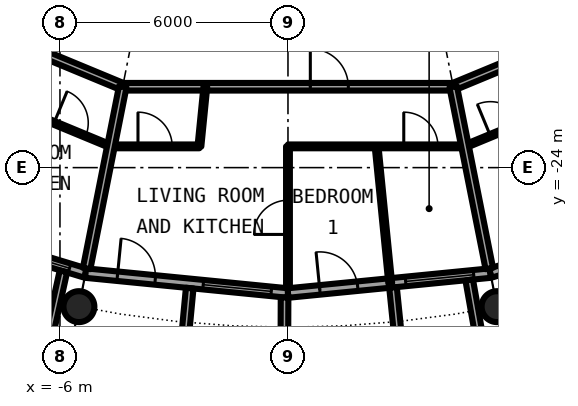
"""IFC4 building model, lengths in metres.
Left out: names, types, materials, properties, quantities, classifications, styles, units other than length and angle.
Written with IfcOpenShell. Run it as: python <this file> out.ifc"""

import sys

from ifc_helpers import new_model, si_unit, direction, frame, frame_2d, origin, origin_2d, place, context, subcontext, project, spatial, rectangle, hollow_circle, extrude, element, fill, save


model = new_model("IFC4")
c1 = context("Model", 3, precision=1e-05, world=origin(), true_north=direction((0.0, 1.0)))
c2 = subcontext(c1, "Body", "Model", "MODEL_VIEW")
j1 = project(units=[si_unit("LENGTHUNIT", "METRE"), si_unit("PLANEANGLEUNIT", "RADIAN")], contexts=[c1])
p1 = place(None, origin())
s1 = spatial("IfcSite", under=j1, at=p1, CompositionType="ELEMENT")
p2 = place(p1, origin())
s2 = spatial("IfcBuilding", under=s1, at=p2, CompositionType="ELEMENT")
p3 = place(p2, frame((0.0, 0.0, 170.75)))
s3 = spatial("IfcBuildingStorey", under=s2, at=p3, CompositionType="ELEMENT", Elevation=170.75)
for number, where, z_axis, x_axis in (
    (1, (-5.501, -27.658, 0.0), (0.0, 0.0, 1.0), (1.0, 0.0, 0.0)),
    (2, (5.501, -27.658, 0.0), (0.0, 0.0, 1.0), (1.0, 0.0, 0.0)),
):
    element("IfcColumn", number, at=place(p3, frame(where, z_axis=z_axis, x_axis=x_axis)), inside=s3, PredefinedType="COLUMN", context=c2, shape_type="SweptSolid", body=[
        extrude(hollow_circle(Radius=0.406, WallThickness=0.04, at=origin_2d()), origin(), (0.0, 0.0, 1.0), 3.05),
    ])
p4 = place(p3, frame((-10.447, -25.222, 0.0), z_axis=(0.0, 0.0, 1.0), x_axis=(0.956965678721, -0.290201119486, 0.0)))
e3 = element("IfcWall", 3, at=p4, inside=s3, PredefinedType="SOLIDWALL", context=c2, shape_type="SweptSolid", body=[
    extrude(rectangle(XDim=5.351, YDim=0.25, at=frame_2d((2.676, 0.0))), origin(), (0.0, 0.0, 1.0), 2.7),
])
p5 = place(p4, frame((0.841, 0.0, 0.0)))
e4 = element("IfcOpeningElement", 4, at=p5, cuts=e3, PredefinedType="OPENING", context=c2, shape_type="SweptSolid", body=[
    extrude(rectangle(XDim=1.0, YDim=2.2, at=frame_2d((0.5, 1.1))), frame((0.0, 0.135, 0.0), z_axis=(0.0, -1.0, 0.0), x_axis=(1.0, 0.0, 0.0)), (0.0, 0.0, 1.0), 0.27),
])
p6 = place(p4, frame((3.111, 0.0, 0.3)))
e5 = element("IfcOpeningElement", 5, at=p6, cuts=e3, PredefinedType="OPENING", context=c2, shape_type="SweptSolid", body=[
    extrude(rectangle(XDim=1.8, YDim=2.1, at=frame_2d((0.9, 1.05))), frame((0.0, 0.135, 0.0), z_axis=(0.0, -1.0, 0.0), x_axis=(1.0, 0.0, 0.0)), (0.0, 0.0, 1.0), 0.27),
])
p7 = place(p3, frame((-5.909, -26.729, -0.03), z_axis=(0.0, 0.0, 1.0), x_axis=(-0.216409053917, -0.976302781612, 0.0)))
e6 = element("IfcWall", 6, at=p7, inside=s3, PredefinedType="SOLIDWALL", context=c2, shape_type="SweptSolid", body=[
    extrude(rectangle(XDim=2.925, YDim=0.2, at=frame_2d((1.463, 0.0))), origin(), (0.0, 0.0, 1.0), 2.73),
])
p8 = place(p3, frame((-5.326, -26.775, 0.0), z_axis=(0.0, 0.0, 1.0), x_axis=(0.995173996315, -0.098126026407, 0.0)))
e7 = element("IfcWall", 7, at=p8, inside=s3, PredefinedType="SOLIDWALL", context=c2, shape_type="SweptSolid", body=[
    extrude(rectangle(XDim=5.352, YDim=0.25, at=frame_2d((2.676, 0.0))), origin(), (0.0, 0.0, 1.0), 2.7),
])
p9 = place(p8, frame((0.841, 0.0, 0.0)))
e8 = element("IfcOpeningElement", 8, at=p9, cuts=e7, PredefinedType="OPENING", context=c2, shape_type="SweptSolid", body=[
    extrude(rectangle(XDim=1.0, YDim=2.2, at=frame_2d((0.5, 1.1))), frame((0.0, 0.135, 0.0), z_axis=(0.0, -1.0, 0.0), x_axis=(1.0, 0.0, 0.0)), (0.0, 0.0, 1.0), 0.27),
])
p10 = place(p8, frame((3.111, 0.0, 0.3)))
e9 = element("IfcOpeningElement", 9, at=p10, cuts=e7, PredefinedType="OPENING", context=c2, shape_type="SweptSolid", body=[
    extrude(rectangle(XDim=1.8, YDim=2.1, at=frame_2d((0.9, 1.05))), frame((0.0, 0.135, 0.0), z_axis=(0.0, -1.0, 0.0), x_axis=(1.0, 0.0, 0.0)), (0.0, 0.0, 1.0), 0.27),
])
p11 = place(p3, frame((-2.586, -27.171, -0.03), z_axis=(0.0, 0.0, 1.0), x_axis=(-0.094548432284, -0.995520262954, 0.0)))
e10 = element("IfcWall", 10, at=p11, inside=s3, PredefinedType="SOLIDWALL", context=c2, shape_type="SweptSolid", body=[
    extrude(rectangle(XDim=3.006, YDim=0.2, at=frame_2d((1.503, 0.0))), origin(), (0.0, 0.0, 1.0), 2.73),
])
p12 = place(p3, frame((-0.09, -27.417, -0.03), z_axis=(0.0, 0.0, 1.0), x_axis=(-0.00347308367, -0.999993968827, 0.0)))
e11 = element("IfcWall", 11, at=p12, inside=s3, PredefinedType="SOLIDWALL", context=c2, shape_type="SweptSolid", body=[
    extrude(rectangle(XDim=2.882, YDim=0.2, at=frame_2d((1.441, 0.0))), origin(), (0.0, 0.0, 1.0), 2.73),
])
p13 = place(p3, frame((0.0, -27.3, 0.0), z_axis=(0.0, 0.0, 1.0), x_axis=(0.995173996315, 0.098126026407, 0.0)))
e12 = element("IfcWall", 12, at=p13, inside=s3, PredefinedType="SOLIDWALL", context=c2, shape_type="SweptSolid", body=[
    extrude(rectangle(XDim=5.352, YDim=0.25, at=frame_2d((2.676, 0.0))), origin(), (0.0, 0.0, 1.0), 2.7),
])
p14 = place(p13, frame((0.841, 0.0, 0.0)))
e13 = element("IfcOpeningElement", 13, at=p14, cuts=e12, PredefinedType="OPENING", context=c2, shape_type="SweptSolid", body=[
    extrude(rectangle(XDim=1.0, YDim=2.2, at=frame_2d((0.5, 1.1))), frame((0.0, 0.135, 0.0), z_axis=(0.0, -1.0, 0.0), x_axis=(1.0, 0.0, 0.0)), (0.0, 0.0, 1.0), 0.27),
])
p15 = place(p13, frame((3.111, 0.0, 0.3)))
e14 = element("IfcOpeningElement", 14, at=p15, cuts=e12, PredefinedType="OPENING", context=c2, shape_type="SweptSolid", body=[
    extrude(rectangle(XDim=1.8, YDim=2.1, at=frame_2d((0.9, 1.05))), frame((0.0, 0.135, 0.0), z_axis=(0.0, -1.0, 0.0), x_axis=(1.0, 0.0, 0.0)), (0.0, 0.0, 1.0), 0.27),
])
p16 = place(p3, frame((2.764, -27.153, -0.03), z_axis=(0.0, 0.0, 1.0), x_axis=(0.101505487237, -0.994834979311, 0.0)))
e15 = element("IfcWall", 15, at=p16, inside=s3, PredefinedType="SOLIDWALL", context=c2, shape_type="SweptSolid", body=[
    extrude(rectangle(XDim=3.007, YDim=0.2, at=frame_2d((1.503, 0.0))), origin(), (0.0, 0.0, 1.0), 2.73),
])
p17 = place(p3, frame((4.769, -26.956, -0.03), z_axis=(0.0, 0.0, 1.0), x_axis=(0.174056778901, -0.984735618183, 0.0)))
e16 = element("IfcWall", 16, at=p17, inside=s3, PredefinedType="SOLIDWALL", context=c2, shape_type="SweptSolid", body=[
    extrude(rectangle(XDim=2.925, YDim=0.2, at=frame_2d((1.462, 0.0))), origin(), (0.0, 0.0, 1.0), 2.73),
])
p18 = place(p3, frame((5.326, -26.775, 0.0), z_axis=(0.0, 0.0, 1.0), x_axis=(0.956965678721, 0.290201119486, 0.0)))
e17 = element("IfcWall", 17, at=p18, inside=s3, PredefinedType="SOLIDWALL", context=c2, shape_type="SweptSolid", body=[
    extrude(rectangle(XDim=5.351, YDim=0.25, at=frame_2d((2.676, 0.0))), origin(), (0.0, 0.0, 1.0), 2.7),
])
p19 = place(p18, frame((0.841, 0.0, 0.0)))
e18 = element("IfcOpeningElement", 18, at=p19, cuts=e17, PredefinedType="OPENING", context=c2, shape_type="SweptSolid", body=[
    extrude(rectangle(XDim=1.0, YDim=2.2, at=frame_2d((0.5, 1.1))), frame((0.0, 0.135, 0.0), z_axis=(0.0, -1.0, 0.0), x_axis=(1.0, 0.0, 0.0)), (0.0, 0.0, 1.0), 0.27),
])
p20 = place(p18, frame((3.111, 0.0, 0.3)))
e19 = element("IfcOpeningElement", 19, at=p20, cuts=e17, PredefinedType="OPENING", context=c2, shape_type="SweptSolid", body=[
    extrude(rectangle(XDim=1.8, YDim=2.1, at=frame_2d((0.9, 1.05))), frame((0.0, 0.135, 0.0), z_axis=(0.0, -1.0, 0.0), x_axis=(1.0, 0.0, 0.0)), (0.0, 0.0, 1.0), 0.27),
])
p21 = place(p3, frame((-6.817, -22.549, 0.0), z_axis=(0.0, 0.0, 1.0), x_axis=(0.923923664861, -0.382576870068, 0.0)))
e20 = element("IfcWall", 20, at=p21, inside=s3, PredefinedType="PARTITIONING", context=c2, shape_type="SweptSolid", body=[
    extrude(rectangle(XDim=2.331, YDim=0.1, at=frame_2d((1.166, 0.0))), origin(), (0.0, 0.0, 1.0), 2.7),
])
p22 = place(p21, frame((0.716, 0.0, 0.0)))
e21 = element("IfcOpeningElement", 21, at=p22, cuts=e20, PredefinedType="OPENING", context=c2, shape_type="SweptSolid", body=[
    extrude(rectangle(XDim=0.9, YDim=2.3, at=frame_2d((0.45, 1.15))), frame((0.0, 0.06, 0.0), z_axis=(0.0, -1.0, 0.0), x_axis=(1.0, 0.0, 0.0)), (0.0, 0.0, 1.0), 0.12),
])
p23 = place(p3, frame((-4.663, -23.441, 0.0), z_axis=(0.0, 0.0, 1.0), x_axis=(1.0, 0.0, 0.0)))
e22 = element("IfcWall", 22, at=p23, inside=s3, PredefinedType="PARTITIONING", context=c2, shape_type="SweptSolid", body=[
    extrude(rectangle(XDim=2.332, YDim=0.1, at=frame_2d((1.166, 0.0))), origin(), (0.0, 0.0, 1.0), 2.7),
])
p24 = place(p23, frame((0.716, 0.0, 0.0)))
e23 = element("IfcOpeningElement", 23, at=p24, cuts=e22, PredefinedType="OPENING", context=c2, shape_type="SweptSolid", body=[
    extrude(rectangle(XDim=0.9, YDim=2.3, at=frame_2d((0.45, 1.15))), frame((0.0, 0.06, 0.0), z_axis=(0.0, -1.0, 0.0), x_axis=(1.0, 0.0, 0.0)), (0.0, 0.0, 1.0), 0.12),
])
p25 = place(p3, frame((0.0, -23.441, 0.0), z_axis=(0.0, 0.0, 1.0), x_axis=(1.0, 0.0, 0.0)))
e24 = element("IfcWall", 24, at=p25, inside=s3, PredefinedType="PARTITIONING", context=c2, shape_type="SweptSolid", body=[
    extrude(rectangle(XDim=4.663, YDim=0.1, at=frame_2d((2.332, 0.0))), origin(), (0.0, 0.0, 1.0), 2.7),
])
p26 = place(p25, frame((3.047, 0.0, 0.0)))
e25 = element("IfcOpeningElement", 25, at=p26, cuts=e24, PredefinedType="OPENING", context=c2, shape_type="SweptSolid", body=[
    extrude(rectangle(XDim=0.9, YDim=2.3, at=frame_2d((0.45, 1.15))), frame((0.0, 0.06, 0.0), z_axis=(0.0, -1.0, 0.0), x_axis=(1.0, 0.0, 0.0)), (0.0, 0.0, 1.0), 0.12),
])
p27 = place(p3, frame((4.656, -23.442, 0.0), z_axis=(0.0, 0.0, 1.0), x_axis=(0.923994503548, 0.382405749712, 0.0)))
e26 = element("IfcWall", 26, at=p27, inside=s3, PredefinedType="PARTITIONING", context=c2, shape_type="SweptSolid", body=[
    extrude(rectangle(XDim=4.663, YDim=0.1, at=frame_2d((2.331, 0.0))), origin(), (0.0, 0.0, 1.0), 2.7),
])
p28 = place(p27, frame((0.726, 0.0, 0.0)))
e27 = element("IfcOpeningElement", 27, at=p28, cuts=e26, PredefinedType="OPENING", context=c2, shape_type="SweptSolid", body=[
    extrude(rectangle(XDim=0.9, YDim=2.3, at=frame_2d((0.45, 1.15))), frame((0.0, 0.06, 0.0), z_axis=(0.0, -1.0, 0.0), x_axis=(1.0, 0.0, 0.0)), (0.0, 0.0, 1.0), 0.12),
])
p29 = place(p3, frame((-12.389, -18.542, 0.0), z_axis=(0.0, 0.0, 1.0), x_axis=(0.923867858178, -0.382711615483, 0.0)))
e28 = element("IfcWall", 28, at=p29, inside=s3, PredefinedType="PARTITIONING", context=c2, shape_type="SweptSolid", body=[
    extrude(rectangle(XDim=8.709, YDim=0.2, at=frame_2d((4.354, 0.0))), origin(), (0.0, 0.0, 1.0), 2.7),
])
p30 = place(p29, frame((2.763, 0.0, 0.0)))
e29 = element("IfcOpeningElement", 29, at=p30, cuts=e28, PredefinedType="OPENING", context=c2, shape_type="SweptSolid", body=[
    extrude(rectangle(XDim=1.0, YDim=2.3, at=frame_2d((0.5, 1.15))), frame((0.0, 0.11, 0.0), z_axis=(0.0, -1.0, 0.0), x_axis=(1.0, 0.0, 0.0)), (0.0, 0.0, 1.0), 0.22),
])
p31 = place(p3, frame((-4.351, -21.872, 0.0), z_axis=(0.0, 0.0, 1.0), x_axis=(1.0, 0.0, 0.0)))
e30 = element("IfcWall", 30, at=p31, inside=s3, PredefinedType="PARTITIONING", context=c2, shape_type="SweptSolid", body=[
    extrude(rectangle(XDim=8.702, YDim=0.2, at=frame_2d((4.351, 0.0))), origin(), (0.0, 0.0, 1.0), 2.7),
])
p32 = place(p31, frame((4.939, 0.0, 0.0)))
e31 = element("IfcOpeningElement", 31, at=p32, cuts=e30, PredefinedType="OPENING", context=c2, shape_type="SweptSolid", body=[
    extrude(rectangle(XDim=1.0, YDim=2.3, at=frame_2d((0.5, 1.15))), frame((0.0, 0.11, 0.0), z_axis=(0.0, -1.0, 0.0), x_axis=(1.0, 0.0, 0.0)), (0.0, 0.0, 1.0), 0.22),
])
p33 = place(p3, frame((4.351, -21.872, 0.0), z_axis=(0.0, 0.0, 1.0), x_axis=(0.923825356298, 0.382814199136, 0.0)))
e32 = element("IfcWall", 32, at=p33, inside=s3, PredefinedType="PARTITIONING", context=c2, shape_type="SweptSolid", body=[
    extrude(rectangle(XDim=8.704, YDim=0.2, at=frame_2d((4.352, 0.0))), origin(), (0.0, 0.0, 1.0), 2.7),
])
p34 = place(p33, frame((2.763, 0.0, 0.0)))
e33 = element("IfcOpeningElement", 33, at=p34, cuts=e32, PredefinedType="OPENING", context=c2, shape_type="SweptSolid", body=[
    extrude(rectangle(XDim=1.0, YDim=2.3, at=frame_2d((0.5, 1.15))), frame((0.0, 0.11, 0.0), z_axis=(0.0, -1.0, 0.0), x_axis=(1.0, 0.0, 0.0)), (0.0, 0.0, 1.0), 0.22),
])
p35 = place(p3, frame((-5.298, -26.654, 0.0), z_axis=(0.0, 0.0, 1.0), x_axis=(0.194931286287, 0.980816901173, 0.0)))
e34 = element("IfcWall", 34, at=p35, inside=s3, PredefinedType="PARTITIONING", context=c2, shape_type="SweptSolid", body=[
    extrude(rectangle(XDim=4.875, YDim=0.2, at=frame_2d((2.437, 0.0))), origin(), (0.0, 0.0, 1.0), 2.7),
])
p36 = place(p3, frame((-2.33, -23.441, 0.0), z_axis=(0.0, 0.0, 1.0), x_axis=(0.098951748623, 0.995092232632, 0.0)))
e35 = element("IfcWall", 35, at=p36, inside=s3, PredefinedType="PARTITIONING", context=c2, shape_type="SweptSolid", body=[
    extrude(rectangle(XDim=1.577, YDim=0.1, at=frame_2d((0.788, 0.0))), origin(), (0.0, 0.0, 1.0), 2.7),
])
p37 = place(p3, frame((0.0, -27.175, 0.0), z_axis=(0.0, 0.0, 1.0), x_axis=(0.0, 1.0, 0.0)))
e36 = element("IfcWall", 36, at=p37, inside=s3, PredefinedType="PARTITIONING", context=c2, shape_type="SweptSolid", body=[
    extrude(rectangle(XDim=3.734, YDim=0.1, at=frame_2d((1.867, 0.0))), origin(), (0.0, 0.0, 1.0), 2.7),
])
p38 = place(p37, frame((1.417, 0.0, 0.0)))
e37 = element("IfcOpeningElement", 37, at=p38, cuts=e36, PredefinedType="OPENING", context=c2, shape_type="SweptSolid", body=[
    extrude(rectangle(XDim=0.9, YDim=2.3, at=frame_2d((0.45, 1.15))), frame((0.0, 0.06, 0.0), z_axis=(0.0, -1.0, 0.0), x_axis=(1.0, 0.0, 0.0)), (0.0, 0.0, 1.0), 0.12),
])
p39 = place(p3, frame((2.332, -23.441, 0.0), z_axis=(0.0, 0.0, 1.0), x_axis=(0.099169741095, -0.995070531395, 0.0)))
e38 = element("IfcWall", 38, at=p39, inside=s3, PredefinedType="PARTITIONING", context=c2, shape_type="SweptSolid", body=[
    extrude(rectangle(XDim=3.619, YDim=0.1, at=frame_2d((1.81, 0.0))), origin(), (0.0, 0.0, 1.0), 2.7),
])
p40 = place(p3, frame((4.348, -21.873, 0.0), z_axis=(0.0, 0.0, 1.0), x_axis=(0.194931286287, -0.980816901173, 0.0)))
e39 = element("IfcWall", 39, at=p40, inside=s3, PredefinedType="PARTITIONING", context=c2, shape_type="SweptSolid", body=[
    extrude(rectangle(XDim=4.875, YDim=0.2, at=frame_2d((2.437, 0.0))), origin(), (0.0, 0.0, 1.0), 2.7),
])
p41 = place(p6, origin())
e40 = element("IfcWindow", 40, at=p41, inside=s3, PartitioningType="SINGLE_PANEL", PredefinedType="WINDOW", context=c2, shape_type="SweptSolid", body=[
    extrude(rectangle(XDim=1.8, YDim=2.1, at=frame_2d((0.9, 1.05))), frame((0.0, 0.03, 0.0), z_axis=(0.0, -1.0, 0.0), x_axis=(1.0, 0.0, 0.0)), (0.0, 0.0, 1.0), 0.06),
])
fill(e5, e40)
p42 = place(p9, origin())
e41 = element("IfcDoor", 41, at=p42, inside=s3, OperationType="SINGLE_SWING_LEFT", PredefinedType="DOOR", context=c2, shape_type="SweptSolid", body=[
    extrude(rectangle(XDim=1.0, YDim=2.2, at=frame_2d((0.5, 1.1))), frame((0.0, 0.025, 0.0), z_axis=(0.0, -1.0, 0.0), x_axis=(1.0, 0.0, 0.0)), (0.0, 0.0, 1.0), 0.05),
])
fill(e8, e41)
p43 = place(p10, origin())
e42 = element("IfcWindow", 42, at=p43, inside=s3, PartitioningType="SINGLE_PANEL", PredefinedType="WINDOW", context=c2, shape_type="SweptSolid", body=[
    extrude(rectangle(XDim=1.8, YDim=2.1, at=frame_2d((0.9, 1.05))), frame((0.0, 0.03, 0.0), z_axis=(0.0, -1.0, 0.0), x_axis=(1.0, 0.0, 0.0)), (0.0, 0.0, 1.0), 0.06),
])
fill(e9, e42)
p44 = place(p14, origin())
e43 = element("IfcDoor", 43, at=p44, inside=s3, OperationType="SINGLE_SWING_LEFT", PredefinedType="DOOR", context=c2, shape_type="SweptSolid", body=[
    extrude(rectangle(XDim=1.0, YDim=2.2, at=frame_2d((0.5, 1.1))), frame((0.0, 0.025, 0.0), z_axis=(0.0, -1.0, 0.0), x_axis=(1.0, 0.0, 0.0)), (0.0, 0.0, 1.0), 0.05),
])
fill(e13, e43)
p45 = place(p15, origin())
e44 = element("IfcWindow", 44, at=p45, inside=s3, PartitioningType="SINGLE_PANEL", PredefinedType="WINDOW", context=c2, shape_type="SweptSolid", body=[
    extrude(rectangle(XDim=1.8, YDim=2.1, at=frame_2d((0.9, 1.05))), frame((0.0, 0.03, 0.0), z_axis=(0.0, -1.0, 0.0), x_axis=(1.0, 0.0, 0.0)), (0.0, 0.0, 1.0), 0.06),
])
fill(e14, e44)
p46 = place(p22, origin())
e45 = element("IfcDoor", 45, at=p46, inside=s3, OperationType="SINGLE_SWING_LEFT", PredefinedType="DOOR", context=c2, shape_type="SweptSolid", body=[
    extrude(rectangle(XDim=0.9, YDim=2.3, at=frame_2d((0.45, 1.15))), frame((0.0, 0.025, 0.0), z_axis=(0.0, -1.0, 0.0), x_axis=(1.0, 0.0, 0.0)), (0.0, 0.0, 1.0), 0.05),
])
fill(e21, e45)
p47 = place(p32, origin())
e46 = element("IfcDoor", 46, at=p47, inside=s3, OperationType="SINGLE_SWING_RIGHT", PredefinedType="DOOR", context=c2, shape_type="SweptSolid", body=[
    extrude(rectangle(XDim=1.0, YDim=2.3, at=frame_2d((0.5, 1.15))), frame((0.0, 0.025, 0.0), z_axis=(0.0, -1.0, 0.0), x_axis=(1.0, 0.0, 0.0)), (0.0, 0.0, 1.0), 0.05),
])
fill(e31, e46)
p48 = place(p24, origin())
e47 = element("IfcDoor", 47, at=p48, inside=s3, OperationType="SINGLE_SWING_RIGHT", PredefinedType="DOOR", context=c2, shape_type="SweptSolid", body=[
    extrude(rectangle(XDim=0.9, YDim=2.3, at=frame_2d((0.45, 1.15))), frame((0.0, 0.025, 0.0), z_axis=(0.0, -1.0, 0.0), x_axis=(1.0, 0.0, 0.0)), (0.0, 0.0, 1.0), 0.05),
])
fill(e23, e47)
p49 = place(p38, origin())
e48 = element("IfcDoor", 48, at=p49, inside=s3, OperationType="SINGLE_SWING_RIGHT", PredefinedType="DOOR", context=c2, shape_type="SweptSolid", body=[
    extrude(rectangle(XDim=0.9, YDim=2.3, at=frame_2d((0.45, 1.15))), frame((0.0, 0.025, 0.0), z_axis=(0.0, -1.0, 0.0), x_axis=(1.0, 0.0, 0.0)), (0.0, 0.0, 1.0), 0.05),
])
fill(e37, e48)
p50 = place(p26, origin())
e49 = element("IfcDoor", 49, at=p50, inside=s3, OperationType="SINGLE_SWING_RIGHT", PredefinedType="DOOR", context=c2, shape_type="SweptSolid", body=[
    extrude(rectangle(XDim=0.9, YDim=2.3, at=frame_2d((0.45, 1.15))), frame((0.0, 0.025, 0.0), z_axis=(0.0, -1.0, 0.0), x_axis=(1.0, 0.0, 0.0)), (0.0, 0.0, 1.0), 0.05),
])
fill(e25, e49)
p51 = place(p28, origin())
e50 = element("IfcDoor", 50, at=p51, inside=s3, OperationType="SINGLE_SWING_LEFT", PredefinedType="DOOR", context=c2, shape_type="SweptSolid", body=[
    extrude(rectangle(XDim=0.9, YDim=2.3, at=frame_2d((0.45, 1.15))), frame((0.0, 0.025, 0.0), z_axis=(0.0, -1.0, 0.0), x_axis=(1.0, 0.0, 0.0)), (0.0, 0.0, 1.0), 0.05),
])
fill(e27, e50)
save(model, sys.argv[1])
